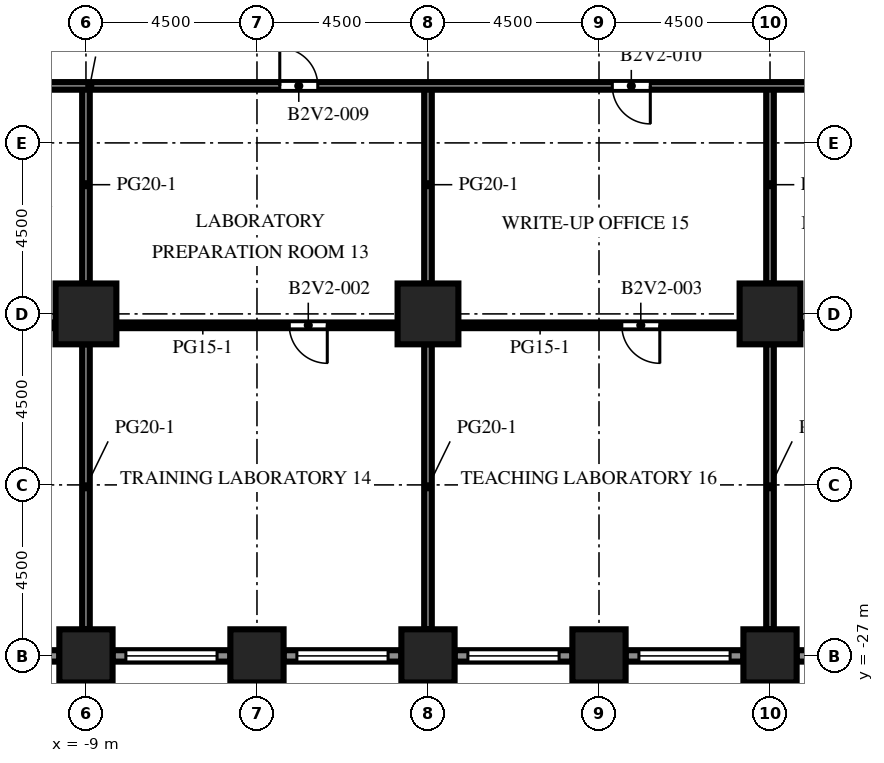
"""IFC4 building model, lengths in metres.
Left out: names, types, materials, properties, quantities, classifications, styles, units other than length and angle.
Written with IfcOpenShell. Run it as: python <this file> out.ifc"""

import sys

from ifc_helpers import new_model, si_unit, direction, frame, frame_2d, origin, origin_2d, place, context, subcontext, project, spatial, rectangle, extrude, element, fill, save


model = new_model("IFC4")
c1 = context("Model", 3, precision=1e-05, world=origin(), true_north=direction((0.0, 1.0)))
c2 = subcontext(c1, "Body", "Model", "MODEL_VIEW")
j1 = project(units=[si_unit("LENGTHUNIT", "METRE"), si_unit("PLANEANGLEUNIT", "RADIAN")], contexts=[c1])
p1 = place(None, origin())
s1 = spatial("IfcSite", under=j1, at=p1, CompositionType="ELEMENT")
p2 = place(p1, origin())
s2 = spatial("IfcBuilding", under=s1, at=p2, CompositionType="ELEMENT")
p3 = place(p2, frame((0.0, 0.0, 58.3)))
s3 = spatial("IfcBuildingStorey", under=s2, at=p3, CompositionType="ELEMENT", Elevation=58.3)
for number, where, z_axis, x_axis in (
    (1, (-9.0, -27.0, 0.0), (0.0, 0.0, 1.0), (1.0, 0.0, 0.0)),
    (2, (-4.5, -27.0, 0.0), (0.0, 0.0, 1.0), (1.0, 0.0, 0.0)),
    (3, (0.0, -27.0, 0.0), (0.0, 0.0, 1.0), (1.0, 0.0, 0.0)),
    (4, (4.5, -27.0, 0.0), (0.0, 0.0, 1.0), (1.0, 0.0, 0.0)),
    (5, (9.0, -27.0, 0.0), (0.0, 0.0, 1.0), (1.0, 0.0, 0.0)),
):
    element("IfcColumn", number, at=place(p3, frame(where, z_axis=z_axis, x_axis=x_axis)), inside=s3, PredefinedType="COLUMN", context=c2, shape_type="SweptSolid", body=[
        extrude(rectangle(XDim=1.4, YDim=1.4, at=origin_2d()), origin(), (0.0, 0.0, 1.0), 4.1),
    ])
for number, where, z_axis, x_axis in (
    (6, (-9.0, -18.0, 0.0), (0.0, 0.0, 1.0), (1.0, 0.0, 0.0)),
    (7, (0.0, -18.0, 0.0), (0.0, 0.0, 1.0), (1.0, 0.0, 0.0)),
    (8, (9.0, -18.0, 0.0), (0.0, 0.0, 1.0), (1.0, 0.0, 0.0)),
):
    element("IfcColumn", number, at=place(p3, frame(where, z_axis=z_axis, x_axis=x_axis)), inside=s3, PredefinedType="COLUMN", context=c2, shape_type="SweptSolid", body=[
        extrude(rectangle(XDim=1.6, YDim=1.6, at=origin_2d()), origin(), (0.0, 0.0, 1.0), 4.1),
    ])
p4 = place(p3, frame((-9.7, -27.0, 0.0), z_axis=(0.0, 0.0, 1.0), x_axis=(-1.0, 0.0, 0.0)))
e9 = element("IfcWall", 9, at=p4, inside=s3, PredefinedType="SOLIDWALL", context=c2, shape_type="SweptSolid", body=[
    extrude(rectangle(XDim=3.1, YDim=0.3, at=frame_2d((1.55, 0.0))), origin(), (0.0, 0.0, 1.0), 2.75),
])
p5 = place(p4, frame((1.05, 0.0, 0.0)))
e10 = element("IfcOpeningElement", 10, at=p5, cuts=e9, PredefinedType="OPENING", context=c2, shape_type="SweptSolid", body=[
    extrude(rectangle(XDim=1.0, YDim=2.2, at=frame_2d((0.5, 1.1))), frame((0.0, 0.16, 0.0), z_axis=(0.0, -1.0, 0.0), x_axis=(1.0, 0.0, 0.0)), (0.0, 0.0, 1.0), 0.32),
])
p6 = place(p3, frame((-5.2, -27.0, 0.0), z_axis=(0.0, 0.0, 1.0), x_axis=(-1.0, 0.0, 0.0)))
e11 = element("IfcWall", 11, at=p6, inside=s3, PredefinedType="SOLIDWALL", context=c2, shape_type="SweptSolid", body=[
    extrude(rectangle(XDim=3.1, YDim=0.3, at=frame_2d((1.55, 0.0))), origin(), (0.0, 0.0, 1.0), 2.75),
])
p7 = place(p6, frame((0.35, 0.0, 0.8)))
e12 = element("IfcOpeningElement", 12, at=p7, cuts=e11, PredefinedType="OPENING", context=c2, shape_type="SweptSolid", body=[
    extrude(rectangle(XDim=2.4, YDim=1.7, at=frame_2d((1.2, 0.85))), frame((0.0, 0.16, 0.0), z_axis=(0.0, -1.0, 0.0), x_axis=(1.0, 0.0, 0.0)), (0.0, 0.0, 1.0), 0.32),
])
p8 = place(p3, frame((-0.7, -27.0, 0.0), z_axis=(0.0, 0.0, 1.0), x_axis=(-1.0, 0.0, 0.0)))
e13 = element("IfcWall", 13, at=p8, inside=s3, PredefinedType="SOLIDWALL", context=c2, shape_type="SweptSolid", body=[
    extrude(rectangle(XDim=3.1, YDim=0.3, at=frame_2d((1.55, 0.0))), origin(), (0.0, 0.0, 1.0), 2.75),
])
p9 = place(p8, frame((0.35, 0.0, 0.8)))
e14 = element("IfcOpeningElement", 14, at=p9, cuts=e13, PredefinedType="OPENING", context=c2, shape_type="SweptSolid", body=[
    extrude(rectangle(XDim=2.4, YDim=1.7, at=frame_2d((1.2, 0.85))), frame((0.0, 0.16, 0.0), z_axis=(0.0, -1.0, 0.0), x_axis=(1.0, 0.0, 0.0)), (0.0, 0.0, 1.0), 0.32),
])
p10 = place(p3, frame((3.8, -27.0, 0.0), z_axis=(0.0, 0.0, 1.0), x_axis=(-1.0, 0.0, 0.0)))
e15 = element("IfcWall", 15, at=p10, inside=s3, PredefinedType="SOLIDWALL", context=c2, shape_type="SweptSolid", body=[
    extrude(rectangle(XDim=3.1, YDim=0.3, at=frame_2d((1.55, 0.0))), origin(), (0.0, 0.0, 1.0), 2.75),
])
p11 = place(p10, frame((0.35, 0.0, 0.8)))
e16 = element("IfcOpeningElement", 16, at=p11, cuts=e15, PredefinedType="OPENING", context=c2, shape_type="SweptSolid", body=[
    extrude(rectangle(XDim=2.4, YDim=1.7, at=frame_2d((1.2, 0.85))), frame((0.0, 0.16, 0.0), z_axis=(0.0, -1.0, 0.0), x_axis=(1.0, 0.0, 0.0)), (0.0, 0.0, 1.0), 0.32),
])
p12 = place(p3, frame((8.3, -27.0, 0.0), z_axis=(0.0, 0.0, 1.0), x_axis=(-1.0, 0.0, 0.0)))
e17 = element("IfcWall", 17, at=p12, inside=s3, PredefinedType="SOLIDWALL", context=c2, shape_type="SweptSolid", body=[
    extrude(rectangle(XDim=3.1, YDim=0.3, at=frame_2d((1.55, 0.0))), origin(), (0.0, 0.0, 1.0), 2.75),
])
p13 = place(p12, frame((0.35, 0.0, 0.8)))
e18 = element("IfcOpeningElement", 18, at=p13, cuts=e17, PredefinedType="OPENING", context=c2, shape_type="SweptSolid", body=[
    extrude(rectangle(XDim=2.4, YDim=1.7, at=frame_2d((1.2, 0.85))), frame((0.0, 0.16, 0.0), z_axis=(0.0, -1.0, 0.0), x_axis=(1.0, 0.0, 0.0)), (0.0, 0.0, 1.0), 0.32),
])
p14 = place(p3, frame((12.8, -27.0, 0.0), z_axis=(0.0, 0.0, 1.0), x_axis=(-1.0, 0.0, 0.0)))
e19 = element("IfcWall", 19, at=p14, inside=s3, PredefinedType="SOLIDWALL", context=c2, shape_type="SweptSolid", body=[
    extrude(rectangle(XDim=3.1, YDim=0.3, at=frame_2d((1.55, 0.0))), origin(), (0.0, 0.0, 1.0), 2.75),
])
p15 = place(p14, frame((0.35, 0.0, 0.8)))
e20 = element("IfcOpeningElement", 20, at=p15, cuts=e19, PredefinedType="OPENING", context=c2, shape_type="SweptSolid", body=[
    extrude(rectangle(XDim=2.4, YDim=1.7, at=frame_2d((1.2, 0.85))), frame((0.0, 0.16, 0.0), z_axis=(0.0, -1.0, 0.0), x_axis=(1.0, 0.0, 0.0)), (0.0, 0.0, 1.0), 0.32),
])
p16 = place(p3, frame((-9.0, -26.3, 0.0), z_axis=(0.0, 0.0, 1.0), x_axis=(0.0, 1.0, 0.0)))
e21 = element("IfcWall", 21, at=p16, inside=s3, PredefinedType="PARTITIONING", context=c2, shape_type="SweptSolid", body=[
    extrude(rectangle(XDim=7.5, YDim=0.2, at=frame_2d((3.75, 0.0))), origin(), (0.0, 0.0, 1.0), 3.65),
])
p17 = place(p3, frame((-9.0, -17.2, 0.0), z_axis=(0.0, 0.0, 1.0), x_axis=(0.0, 1.0, 0.0)))
e22 = element("IfcWall", 22, at=p17, inside=s3, PredefinedType="PARTITIONING", context=c2, shape_type="SweptSolid", body=[
    extrude(rectangle(XDim=5.2, YDim=0.2, at=frame_2d((2.6, 0.0))), origin(), (0.0, 0.0, 1.0), 3.65),
])
p18 = place(p3, frame((0.0, -26.3, 0.0), z_axis=(0.0, 0.0, 1.0), x_axis=(0.0, 1.0, 0.0)))
e23 = element("IfcWall", 23, at=p18, inside=s3, PredefinedType="PARTITIONING", context=c2, shape_type="SweptSolid", body=[
    extrude(rectangle(XDim=7.5, YDim=0.2, at=frame_2d((3.75, 0.0))), origin(), (0.0, 0.0, 1.0), 3.65),
])
p19 = place(p3, frame((0.0, -17.2, 0.0), z_axis=(0.0, 0.0, 1.0), x_axis=(0.0, 1.0, 0.0)))
e24 = element("IfcWall", 24, at=p19, inside=s3, PredefinedType="PARTITIONING", context=c2, shape_type="SweptSolid", body=[
    extrude(rectangle(XDim=5.2, YDim=0.2, at=frame_2d((2.6, 0.0))), origin(), (0.0, 0.0, 1.0), 3.65),
])
p20 = place(p3, frame((9.0, -26.3, 0.0), z_axis=(0.0, 0.0, 1.0), x_axis=(0.0, 1.0, 0.0)))
e25 = element("IfcWall", 25, at=p20, inside=s3, PredefinedType="PARTITIONING", context=c2, shape_type="SweptSolid", body=[
    extrude(rectangle(XDim=7.5, YDim=0.2, at=frame_2d((3.75, 0.0))), origin(), (0.0, 0.0, 1.0), 3.65),
])
p21 = place(p3, frame((9.0, -17.2, 0.0), z_axis=(0.0, 0.0, 1.0), x_axis=(0.0, 1.0, 0.0)))
e26 = element("IfcWall", 26, at=p21, inside=s3, PredefinedType="PARTITIONING", context=c2, shape_type="SweptSolid", body=[
    extrude(rectangle(XDim=5.2, YDim=0.2, at=frame_2d((2.6, 0.0))), origin(), (0.0, 0.0, 1.0), 3.65),
])
p22 = place(p3, frame((-9.8, -18.3, 0.0), z_axis=(0.0, 0.0, 1.0), x_axis=(-1.0, 0.0, 0.0)))
e27 = element("IfcWall", 27, at=p22, inside=s3, PredefinedType="PARTITIONING", context=c2, shape_type="SweptSolid", body=[
    extrude(rectangle(XDim=7.4, YDim=0.15, at=frame_2d((3.7, 0.0))), origin(), (0.0, 0.0, 1.0), 3.65),
])
p23 = place(p22, frame((4.6, 0.0, 0.0)))
e28 = element("IfcOpeningElement", 28, at=p23, cuts=e27, PredefinedType="OPENING", context=c2, shape_type="SweptSolid", body=[
    extrude(rectangle(XDim=1.0, YDim=2.1, at=frame_2d((0.5, 1.05))), frame((0.0, 0.085, 0.0), z_axis=(0.0, -1.0, 0.0), x_axis=(1.0, 0.0, 0.0)), (0.0, 0.0, 1.0), 0.17),
])
p24 = place(p3, frame((-0.8, -18.3, 0.0), z_axis=(0.0, 0.0, 1.0), x_axis=(-1.0, 0.0, 0.0)))
e29 = element("IfcWall", 29, at=p24, inside=s3, PredefinedType="PARTITIONING", context=c2, shape_type="SweptSolid", body=[
    extrude(rectangle(XDim=7.4, YDim=0.15, at=frame_2d((3.7, 0.0))), origin(), (0.0, 0.0, 1.0), 3.65),
])
p25 = place(p24, frame((1.85, 0.0, 0.0)))
e30 = element("IfcOpeningElement", 30, at=p25, cuts=e29, PredefinedType="OPENING", context=c2, shape_type="SweptSolid", body=[
    extrude(rectangle(XDim=1.0, YDim=2.1, at=frame_2d((0.5, 1.05))), frame((0.0, 0.085, 0.0), z_axis=(0.0, -1.0, 0.0), x_axis=(1.0, 0.0, 0.0)), (0.0, 0.0, 1.0), 0.17),
])
p26 = place(p3, frame((8.2, -18.3, 0.0), z_axis=(0.0, 0.0, 1.0), x_axis=(-1.0, 0.0, 0.0)))
e31 = element("IfcWall", 31, at=p26, inside=s3, PredefinedType="PARTITIONING", context=c2, shape_type="SweptSolid", body=[
    extrude(rectangle(XDim=7.4, YDim=0.15, at=frame_2d((3.7, 0.0))), origin(), (0.0, 0.0, 1.0), 3.65),
])
p27 = place(p26, frame((2.1, 0.0, 0.0)))
e32 = element("IfcOpeningElement", 32, at=p27, cuts=e31, PredefinedType="OPENING", context=c2, shape_type="SweptSolid", body=[
    extrude(rectangle(XDim=1.0, YDim=2.1, at=frame_2d((0.5, 1.05))), frame((0.0, 0.085, 0.0), z_axis=(0.0, -1.0, 0.0), x_axis=(1.0, 0.0, 0.0)), (0.0, 0.0, 1.0), 0.17),
])
p28 = place(p3, frame((17.2, -18.3, 0.0), z_axis=(0.0, 0.0, 1.0), x_axis=(-1.0, 0.0, 0.0)))
e33 = element("IfcWall", 33, at=p28, inside=s3, PredefinedType="PARTITIONING", context=c2, shape_type="SweptSolid", body=[
    extrude(rectangle(XDim=7.4, YDim=0.15, at=frame_2d((3.7, 0.0))), origin(), (0.0, 0.0, 1.0), 3.65),
])
p29 = place(p28, frame((1.85, 0.0, 0.0)))
e34 = element("IfcOpeningElement", 34, at=p29, cuts=e33, PredefinedType="OPENING", context=c2, shape_type="SweptSolid", body=[
    extrude(rectangle(XDim=1.0, YDim=2.1, at=frame_2d((0.5, 1.05))), frame((0.0, 0.085, 0.0), z_axis=(0.0, -1.0, 0.0), x_axis=(1.0, 0.0, 0.0)), (0.0, 0.0, 1.0), 0.17),
])
p30 = place(p3, frame((31.35, -12.0, 0.0), z_axis=(0.0, 0.0, 1.0), x_axis=(-1.0, 0.0, 0.0)))
e35 = element("IfcWall", 35, at=p30, inside=s3, PredefinedType="PARTITIONING", context=c2, shape_type="SweptSolid", body=[
    extrude(rectangle(XDim=53.7, YDim=0.2, at=frame_2d((26.85, 0.0))), origin(), (0.0, 0.0, 1.0), 3.65),
])
p31 = place(p30, frame((45.25, 0.0, 0.0)))
e36 = element("IfcOpeningElement", 36, at=p31, cuts=e35, PredefinedType="OPENING", context=c2, shape_type="SweptSolid", body=[
    extrude(rectangle(XDim=1.0, YDim=2.1, at=frame_2d((0.5, 1.05))), frame((0.0, 0.11, 0.0), z_axis=(0.0, -1.0, 0.0), x_axis=(1.0, 0.0, 0.0)), (0.0, 0.0, 1.0), 0.22),
])
p32 = place(p30, frame((34.25, 0.0, 0.0)))
e37 = element("IfcOpeningElement", 37, at=p32, cuts=e35, PredefinedType="OPENING", context=c2, shape_type="SweptSolid", body=[
    extrude(rectangle(XDim=1.0, YDim=2.1, at=frame_2d((0.5, 1.05))), frame((0.0, 0.11, 0.0), z_axis=(0.0, -1.0, 0.0), x_axis=(1.0, 0.0, 0.0)), (0.0, 0.0, 1.0), 0.22),
])
p33 = place(p30, frame((25.5, 0.0, 0.0)))
e38 = element("IfcOpeningElement", 38, at=p33, cuts=e35, PredefinedType="OPENING", context=c2, shape_type="SweptSolid", body=[
    extrude(rectangle(XDim=1.0, YDim=2.1, at=frame_2d((0.5, 1.05))), frame((0.0, 0.11, 0.0), z_axis=(0.0, -1.0, 0.0), x_axis=(1.0, 0.0, 0.0)), (0.0, 0.0, 1.0), 0.22),
])
p34 = place(p30, frame((15.0, 0.0, 0.0)))
e39 = element("IfcOpeningElement", 39, at=p34, cuts=e35, PredefinedType="OPENING", context=c2, shape_type="SweptSolid", body=[
    extrude(rectangle(XDim=1.0, YDim=2.1, at=frame_2d((0.5, 1.05))), frame((0.0, 0.11, 0.0), z_axis=(0.0, -1.0, 0.0), x_axis=(1.0, 0.0, 0.0)), (0.0, 0.0, 1.0), 0.22),
])
p35 = place(p30, frame((5.0, 0.0, 0.0)))
e40 = element("IfcOpeningElement", 40, at=p35, cuts=e35, PredefinedType="OPENING", context=c2, shape_type="SweptSolid", body=[
    extrude(rectangle(XDim=1.0, YDim=2.1, at=frame_2d((0.5, 1.05))), frame((0.0, 0.11, 0.0), z_axis=(0.0, -1.0, 0.0), x_axis=(1.0, 0.0, 0.0)), (0.0, 0.0, 1.0), 0.22),
])
p36 = place(p7, origin())
e41 = element("IfcWindow", 41, at=p36, inside=s3, PartitioningType="SINGLE_PANEL", PredefinedType="WINDOW", context=c2, shape_type="SweptSolid", body=[
    extrude(rectangle(XDim=2.4, YDim=1.7, at=frame_2d((1.2, 0.85))), frame((0.0, 0.03, 0.0), z_axis=(0.0, -1.0, 0.0), x_axis=(1.0, 0.0, 0.0)), (0.0, 0.0, 1.0), 0.06),
])
fill(e12, e41)
p37 = place(p9, origin())
e42 = element("IfcWindow", 42, at=p37, inside=s3, PartitioningType="SINGLE_PANEL", PredefinedType="WINDOW", context=c2, shape_type="SweptSolid", body=[
    extrude(rectangle(XDim=2.4, YDim=1.7, at=frame_2d((1.2, 0.85))), frame((0.0, 0.03, 0.0), z_axis=(0.0, -1.0, 0.0), x_axis=(1.0, 0.0, 0.0)), (0.0, 0.0, 1.0), 0.06),
])
fill(e14, e42)
p38 = place(p11, origin())
e43 = element("IfcWindow", 43, at=p38, inside=s3, PartitioningType="SINGLE_PANEL", PredefinedType="WINDOW", context=c2, shape_type="SweptSolid", body=[
    extrude(rectangle(XDim=2.4, YDim=1.7, at=frame_2d((1.2, 0.85))), frame((0.0, 0.03, 0.0), z_axis=(0.0, -1.0, 0.0), x_axis=(1.0, 0.0, 0.0)), (0.0, 0.0, 1.0), 0.06),
])
fill(e16, e43)
p39 = place(p13, origin())
e44 = element("IfcWindow", 44, at=p39, inside=s3, PartitioningType="SINGLE_PANEL", PredefinedType="WINDOW", context=c2, shape_type="SweptSolid", body=[
    extrude(rectangle(XDim=2.4, YDim=1.7, at=frame_2d((1.2, 0.85))), frame((0.0, 0.03, 0.0), z_axis=(0.0, -1.0, 0.0), x_axis=(1.0, 0.0, 0.0)), (0.0, 0.0, 1.0), 0.06),
])
fill(e18, e44)
p40 = place(p25, origin())
e45 = element("IfcDoor", 45, at=p40, inside=s3, OperationType="SINGLE_SWING_LEFT", PredefinedType="DOOR", context=c2, shape_type="SweptSolid", body=[
    extrude(rectangle(XDim=1.0, YDim=2.1, at=frame_2d((0.5, 1.05))), frame((0.0, 0.025, 0.0), z_axis=(0.0, -1.0, 0.0), x_axis=(1.0, 0.0, 0.0)), (0.0, 0.0, 1.0), 0.05),
])
fill(e30, e45)
p41 = place(p27, origin())
e46 = element("IfcDoor", 46, at=p41, inside=s3, OperationType="SINGLE_SWING_LEFT", PredefinedType="DOOR", context=c2, shape_type="SweptSolid", body=[
    extrude(rectangle(XDim=1.0, YDim=2.1, at=frame_2d((0.5, 1.05))), frame((0.0, 0.025, 0.0), z_axis=(0.0, -1.0, 0.0), x_axis=(1.0, 0.0, 0.0)), (0.0, 0.0, 1.0), 0.05),
])
fill(e32, e46)
p42 = place(p32, origin())
e47 = element("IfcDoor", 47, at=p42, inside=s3, OperationType="SINGLE_SWING_RIGHT", PredefinedType="DOOR", context=c2, shape_type="SweptSolid", body=[
    extrude(rectangle(XDim=1.0, YDim=2.1, at=frame_2d((0.5, 1.05))), frame((0.0, 0.025, 0.0), z_axis=(0.0, -1.0, 0.0), x_axis=(1.0, 0.0, 0.0)), (0.0, 0.0, 1.0), 0.05),
])
fill(e37, e47)
p43 = place(p33, origin())
e48 = element("IfcDoor", 48, at=p43, inside=s3, OperationType="SINGLE_SWING_LEFT", PredefinedType="DOOR", context=c2, shape_type="SweptSolid", body=[
    extrude(rectangle(XDim=1.0, YDim=2.1, at=frame_2d((0.5, 1.05))), frame((0.0, 0.025, 0.0), z_axis=(0.0, -1.0, 0.0), x_axis=(1.0, 0.0, 0.0)), (0.0, 0.0, 1.0), 0.05),
])
fill(e38, e48)
save(model, sys.argv[1])
